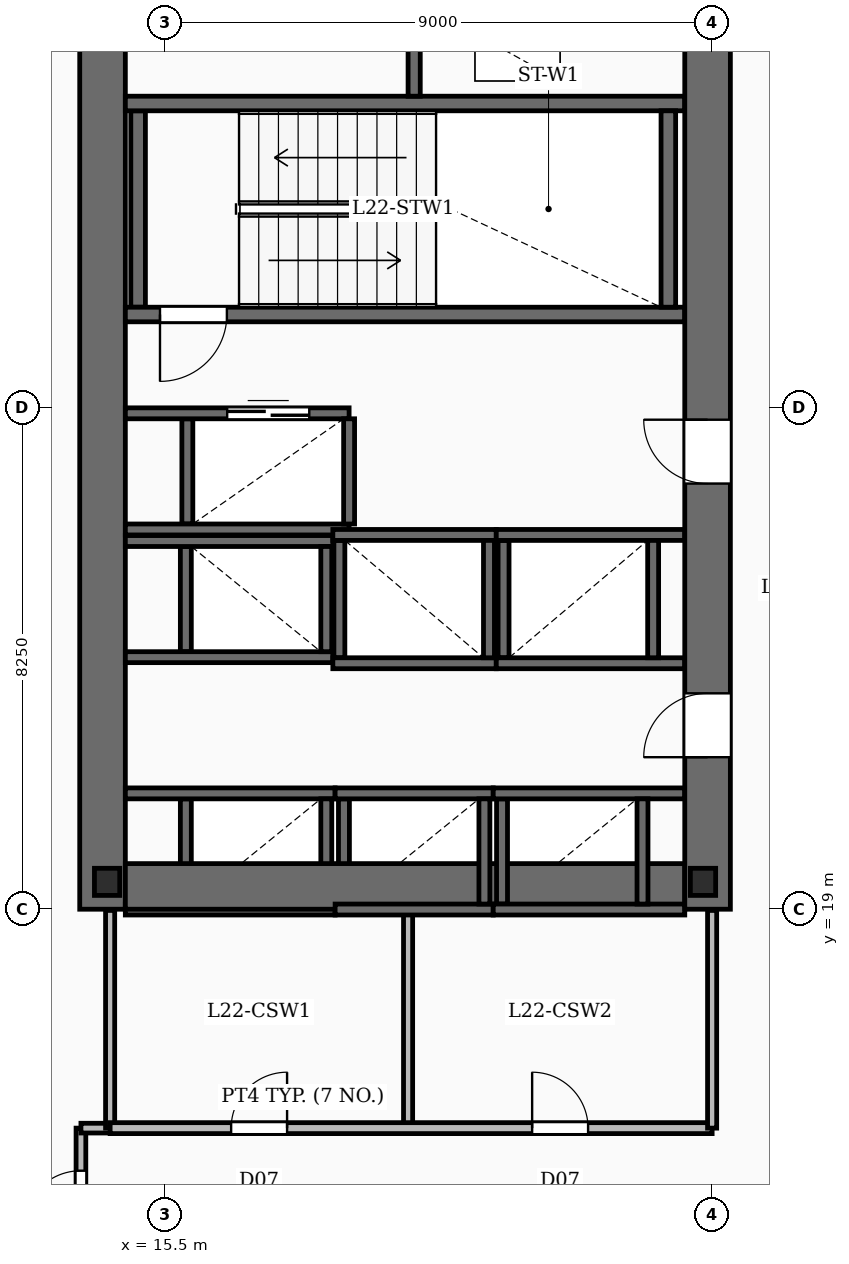
"""IFC4 building model, lengths in metres.
Left out: names, types, materials, properties, quantities, classifications, styles, units other than length and angle.
Written with IfcOpenShell. Run it as: python <this file> out.ifc"""

import sys

from ifc_helpers import new_model, si_unit, direction, frame, frame_2d, origin, origin_2d, place, context, subcontext, project, spatial, rectangle, i_section, extrude, element, fill, save


model = new_model("IFC4")
c1 = context("Model", 3, precision=1e-05, world=origin(), true_north=direction((0.0, 1.0)))
c2 = subcontext(c1, "Body", "Model", "MODEL_VIEW")
j1 = project(units=[si_unit("LENGTHUNIT", "METRE"), si_unit("PLANEANGLEUNIT", "RADIAN")], contexts=[c1])
p1 = place(None, origin())
s1 = spatial("IfcSite", under=j1, at=p1, CompositionType="ELEMENT")
p2 = place(p1, origin())
s2 = spatial("IfcBuilding", under=s1, at=p2, CompositionType="ELEMENT")
p3 = place(p2, frame((0.0, 0.0, 99.7)))
s3 = spatial("IfcBuildingStorey", under=s2, at=p3, CompositionType="ELEMENT", Elevation=99.7)
p4 = place(p3, frame((14.475, 19.0, -0.45), z_axis=(0.0, 0.0, 1.0), x_axis=(0.0, 1.0, 0.0)))
e1 = element("IfcWall", 1, at=p4, inside=s3, PredefinedType="SHEAR", context=c2, shape_type="SweptSolid", body=[
    extrude(rectangle(XDim=15.3, YDim=0.75, at=frame_2d((7.65, 0.0))), origin(), (0.0, 0.0, 1.0), 3.93),
])
p5 = place(p3, frame((24.425, 19.0, -0.45), z_axis=(0.0, 0.0, 1.0), x_axis=(0.0, 1.0, 0.0)))
e2 = element("IfcWall", 2, at=p5, inside=s3, PredefinedType="SHEAR", context=c2, shape_type="SweptSolid", body=[
    extrude(rectangle(XDim=15.3, YDim=0.75, at=frame_2d((7.65, 0.0))), origin(), (0.0, 0.0, 1.0), 3.93),
])
p6 = place(p5, frame((2.5, 0.0, 0.45)))
e3 = element("IfcOpeningElement", 3, at=p6, cuts=e2, PredefinedType="OPENING", context=c2, shape_type="SweptSolid", body=[
    extrude(rectangle(XDim=1.05, YDim=2.15, at=frame_2d((0.525, 1.075))), frame((0.0, 0.385, 0.0), z_axis=(0.0, -1.0, 0.0), x_axis=(1.0, 0.0, 0.0)), (0.0, 0.0, 1.0), 0.77),
])
p7 = place(p5, frame((7.0, 0.0, 0.45)))
e4 = element("IfcOpeningElement", 4, at=p7, cuts=e2, PredefinedType="OPENING", context=c2, shape_type="SweptSolid", body=[
    extrude(rectangle(XDim=1.05, YDim=2.15, at=frame_2d((0.525, 1.075))), frame((0.0, 0.385, 0.0), z_axis=(0.0, -1.0, 0.0), x_axis=(1.0, 0.0, 0.0)), (0.0, 0.0, 1.0), 0.77),
])
p8 = place(p3, frame((14.85, 19.375, -0.45), z_axis=(0.0, 0.0, 1.0), x_axis=(1.0, 0.0, 0.0)))
e5 = element("IfcWall", 5, at=p8, inside=s3, PredefinedType="SHEAR", context=c2, shape_type="SweptSolid", body=[
    extrude(rectangle(XDim=9.2, YDim=0.75, at=frame_2d((4.6, 0.0))), origin(), (0.0, 0.0, 1.0), 3.93),
])
for number, where, z_axis, x_axis in (
    (6, (14.55, 19.45, -0.45), (0.0, 0.0, 1.0), (1.0, 0.0, 0.0)),
    (7, (24.35, 19.45, -0.45), (0.0, 0.0, 1.0), (1.0, 0.0, 0.0)),
):
    element("IfcColumn", number, at=place(p3, frame(where, z_axis=z_axis, x_axis=x_axis)), inside=s3, PredefinedType="COLUMN", context=c2, shape_type="SweptSolid", body=[
        extrude(i_section(OverallWidth=0.416, OverallDepth=0.446, WebThickness=0.039, FlangeThickness=0.063, FilletRadius=0.02, at=origin_2d()), origin(), (0.0, 0.0, 1.0), 3.93),
    ])
p9 = place(p3, frame((24.05, 28.78, 0.0), z_axis=(0.0, 0.0, 1.0), x_axis=(-1.0, 0.0, 0.0)))
e8 = element("IfcWall", 8, at=p9, inside=s3, PredefinedType="SOLIDWALL", context=c2, shape_type="SweptSolid", body=[
    extrude(rectangle(XDim=9.2, YDim=0.24, at=frame_2d((4.6, 0.0))), origin(), (0.0, 0.0, 1.0), 3.48),
])
p10 = place(p9, frame((7.53, 0.0, 0.0)))
e9 = element("IfcOpeningElement", 9, at=p10, cuts=e8, PredefinedType="OPENING", context=c2, shape_type="SweptSolid", body=[
    extrude(rectangle(XDim=1.1, YDim=2.15, at=frame_2d((0.55, 1.075))), frame((0.0, 0.13, 0.0), z_axis=(0.0, -1.0, 0.0), x_axis=(1.0, 0.0, 0.0)), (0.0, 0.0, 1.0), 0.26),
])
p11 = place(p3, frame((14.85, 32.25, 0.0), z_axis=(0.0, 0.0, 1.0), x_axis=(1.0, 0.0, 0.0)))
e10 = element("IfcWall", 10, at=p11, inside=s3, PredefinedType="SOLIDWALL", context=c2, shape_type="SweptSolid", body=[
    extrude(rectangle(XDim=9.2, YDim=0.24, at=frame_2d((4.6, 0.0))), origin(), (0.0, 0.0, 1.0), 3.48),
])
for number, where, z_axis, x_axis in (
    (11, (15.06, 28.9, 0.0), (0.0, 0.0, 1.0), (0.0, 1.0, 0.0)),
    (12, (23.78, 28.9, 0.0), (0.0, 0.0, 1.0), (0.0, 1.0, 0.0)),
):
    element("IfcWall", number, at=place(p3, frame(where, z_axis=z_axis, x_axis=x_axis)), inside=s3, PredefinedType="SOLIDWALL", context=c2, shape_type="SweptSolid", body=[
        extrude(rectangle(XDim=3.23, YDim=0.24, at=frame_2d((1.615, 0.0))), origin(), (0.0, 0.0, 1.0), 3.48),
    ])
p12 = place(p3, frame((19.6, 32.37, 0.0), z_axis=(0.0, 0.0, 1.0), x_axis=(0.0, 1.0, 0.0)))
e13 = element("IfcWall", 13, at=p12, inside=s3, PredefinedType="SOLIDWALL", context=c2, shape_type="SweptSolid", body=[
    extrude(rectangle(XDim=1.13, YDim=0.2, at=frame_2d((0.565, 0.0))), origin(), (0.0, 0.0, 1.0), 3.48),
])
for number, where, z_axis, x_axis in (
    (14, (14.85, 20.905, 0.0), (0.0, 0.0, 1.0), (1.0, 0.0, 0.0)),
    (15, (14.85, 18.995, 0.0), (0.0, 0.0, 1.0), (1.0, 0.0, 0.0)),
):
    element("IfcWall", number, at=place(p3, frame(where, z_axis=z_axis, x_axis=x_axis)), inside=s3, PredefinedType="SOLIDWALL", context=c2, shape_type="SweptSolid", body=[
        extrude(rectangle(XDim=3.45, YDim=0.18, at=frame_2d((1.725, 0.0))), origin(), (0.0, 0.0, 1.0), 3.48),
    ])
for number, where, z_axis, x_axis in (
    (16, (15.845, 19.085, 0.0), (0.0, 0.0, 1.0), (0.0, 1.0, 0.0)),
    (17, (18.155, 19.085, 0.0), (0.0, 0.0, 1.0), (0.0, 1.0, 0.0)),
):
    element("IfcWall", number, at=place(p3, frame(where, z_axis=z_axis, x_axis=x_axis)), inside=s3, PredefinedType="SOLIDWALL", context=c2, shape_type="SweptSolid", body=[
        extrude(rectangle(XDim=1.73, YDim=0.18, at=frame_2d((0.865, 0.0))), origin(), (0.0, 0.0, 1.0), 3.48),
    ])
for number, where, z_axis, x_axis in (
    (18, (18.3, 20.905, 0.0), (0.0, 0.0, 1.0), (1.0, 0.0, 0.0)),
    (19, (18.3, 18.995, 0.0), (0.0, 0.0, 1.0), (1.0, 0.0, 0.0)),
):
    element("IfcWall", number, at=place(p3, frame(where, z_axis=z_axis, x_axis=x_axis)), inside=s3, PredefinedType="SOLIDWALL", context=c2, shape_type="SweptSolid", body=[
        extrude(rectangle(XDim=2.6, YDim=0.18, at=frame_2d((1.3, 0.0))), origin(), (0.0, 0.0, 1.0), 3.48),
    ])
for number, where, z_axis, x_axis in (
    (20, (18.445, 19.085, 0.0), (0.0, 0.0, 1.0), (0.0, 1.0, 0.0)),
    (21, (20.755, 19.085, 0.0), (0.0, 0.0, 1.0), (0.0, 1.0, 0.0)),
):
    element("IfcWall", number, at=place(p3, frame(where, z_axis=z_axis, x_axis=x_axis)), inside=s3, PredefinedType="SOLIDWALL", context=c2, shape_type="SweptSolid", body=[
        extrude(rectangle(XDim=1.73, YDim=0.18, at=frame_2d((0.865, 0.0))), origin(), (0.0, 0.0, 1.0), 3.48),
    ])
for number, where, z_axis, x_axis in (
    (22, (20.9, 20.905, 0.0), (0.0, 0.0, 1.0), (1.0, 0.0, 0.0)),
    (23, (20.9, 18.995, 0.0), (0.0, 0.0, 1.0), (1.0, 0.0, 0.0)),
):
    element("IfcWall", number, at=place(p3, frame(where, z_axis=z_axis, x_axis=x_axis)), inside=s3, PredefinedType="SOLIDWALL", context=c2, shape_type="SweptSolid", body=[
        extrude(rectangle(XDim=3.15, YDim=0.18, at=frame_2d((1.575, 0.0))), origin(), (0.0, 0.0, 1.0), 3.48),
    ])
for number, where, z_axis, x_axis in (
    (24, (21.045, 19.085, 0.0), (0.0, 0.0, 1.0), (0.0, 1.0, 0.0)),
    (25, (23.355, 19.085, 0.0), (0.0, 0.0, 1.0), (0.0, 1.0, 0.0)),
):
    element("IfcWall", number, at=place(p3, frame(where, z_axis=z_axis, x_axis=x_axis)), inside=s3, PredefinedType="SOLIDWALL", context=c2, shape_type="SweptSolid", body=[
        extrude(rectangle(XDim=1.73, YDim=0.18, at=frame_2d((0.865, 0.0))), origin(), (0.0, 0.0, 1.0), 3.48),
    ])
for number, where, z_axis, x_axis in (
    (26, (14.85, 25.055, 0.0), (0.0, 0.0, 1.0), (1.0, 0.0, 0.0)),
    (27, (14.85, 23.145, 0.0), (0.0, 0.0, 1.0), (1.0, 0.0, 0.0)),
):
    element("IfcWall", number, at=place(p3, frame(where, z_axis=z_axis, x_axis=x_axis)), inside=s3, PredefinedType="SOLIDWALL", context=c2, shape_type="SweptSolid", body=[
        extrude(rectangle(XDim=3.412, YDim=0.18, at=frame_2d((1.706, 0.0))), origin(), (0.0, 0.0, 1.0), 3.48),
    ])
for number, where, z_axis, x_axis in (
    (28, (15.845, 23.235, 0.0), (0.0, 0.0, 1.0), (0.0, 1.0, 0.0)),
    (29, (18.155, 23.235, 0.0), (0.0, 0.0, 1.0), (0.0, 1.0, 0.0)),
):
    element("IfcWall", number, at=place(p3, frame(where, z_axis=z_axis, x_axis=x_axis)), inside=s3, PredefinedType="SOLIDWALL", context=c2, shape_type="SweptSolid", body=[
        extrude(rectangle(XDim=1.73, YDim=0.18, at=frame_2d((0.865, 0.0))), origin(), (0.0, 0.0, 1.0), 3.48),
    ])
for number, where, z_axis, x_axis in (
    (30, (18.262, 25.155, 0.0), (0.0, 0.0, 1.0), (1.0, 0.0, 0.0)),
    (31, (18.262, 23.045, 0.0), (0.0, 0.0, 1.0), (1.0, 0.0, 0.0)),
):
    element("IfcWall", number, at=place(p3, frame(where, z_axis=z_axis, x_axis=x_axis)), inside=s3, PredefinedType="SOLIDWALL", context=c2, shape_type="SweptSolid", body=[
        extrude(rectangle(XDim=2.688, YDim=0.18, at=frame_2d((1.344, 0.0))), origin(), (0.0, 0.0, 1.0), 3.48),
    ])
for number, where, z_axis, x_axis in (
    (32, (18.37, 23.135, 0.0), (0.0, 0.0, 1.0), (0.0, 1.0, 0.0)),
    (33, (20.83, 23.135, 0.0), (0.0, 0.0, 1.0), (0.0, 1.0, 0.0)),
):
    element("IfcWall", number, at=place(p3, frame(where, z_axis=z_axis, x_axis=x_axis)), inside=s3, PredefinedType="SOLIDWALL", context=c2, shape_type="SweptSolid", body=[
        extrude(rectangle(XDim=1.93, YDim=0.18, at=frame_2d((0.965, 0.0))), origin(), (0.0, 0.0, 1.0), 3.48),
    ])
for number, where, z_axis, x_axis in (
    (34, (20.95, 25.155, 0.0), (0.0, 0.0, 1.0), (1.0, 0.0, 0.0)),
    (35, (20.95, 23.045, 0.0), (0.0, 0.0, 1.0), (1.0, 0.0, 0.0)),
):
    element("IfcWall", number, at=place(p3, frame(where, z_axis=z_axis, x_axis=x_axis)), inside=s3, PredefinedType="SOLIDWALL", context=c2, shape_type="SweptSolid", body=[
        extrude(rectangle(XDim=3.1, YDim=0.18, at=frame_2d((1.55, 0.0))), origin(), (0.0, 0.0, 1.0), 3.48),
    ])
for number, where, z_axis, x_axis in (
    (36, (21.07, 23.135, 0.0), (0.0, 0.0, 1.0), (0.0, 1.0, 0.0)),
    (37, (23.53, 23.135, 0.0), (0.0, 0.0, 1.0), (0.0, 1.0, 0.0)),
):
    element("IfcWall", number, at=place(p3, frame(where, z_axis=z_axis, x_axis=x_axis)), inside=s3, PredefinedType="SOLIDWALL", context=c2, shape_type="SweptSolid", body=[
        extrude(rectangle(XDim=1.93, YDim=0.18, at=frame_2d((0.965, 0.0))), origin(), (0.0, 0.0, 1.0), 3.48),
    ])
p13 = place(p3, frame((14.85, 27.155, 0.0), z_axis=(0.0, 0.0, 1.0), x_axis=(1.0, 0.0, 0.0)))
e38 = element("IfcWall", 38, at=p13, inside=s3, PredefinedType="SOLIDWALL", context=c2, shape_type="SweptSolid", body=[
    extrude(rectangle(XDim=3.68, YDim=0.18, at=frame_2d((1.84, 0.0))), origin(), (0.0, 0.0, 1.0), 3.48),
])
p14 = place(p13, frame((1.675, 0.0, 0.0)))
e39 = element("IfcOpeningElement", 39, at=p14, cuts=e38, PredefinedType="OPENING", context=c2, shape_type="SweptSolid", body=[
    extrude(rectangle(XDim=1.35, YDim=2.3, at=frame_2d((0.675, 1.15))), frame((0.0, 0.1, 0.0), z_axis=(0.0, -1.0, 0.0), x_axis=(1.0, 0.0, 0.0)), (0.0, 0.0, 1.0), 0.2),
])
p15 = place(p3, frame((14.85, 25.245, 0.0), z_axis=(0.0, 0.0, 1.0), x_axis=(1.0, 0.0, 0.0)))
e40 = element("IfcWall", 40, at=p15, inside=s3, PredefinedType="SOLIDWALL", context=c2, shape_type="SweptSolid", body=[
    extrude(rectangle(XDim=3.68, YDim=0.18, at=frame_2d((1.84, 0.0))), origin(), (0.0, 0.0, 1.0), 3.48),
])
for number, where, z_axis, x_axis in (
    (41, (15.87, 25.335, 0.0), (0.0, 0.0, 1.0), (0.0, 1.0, 0.0)),
    (42, (18.53, 25.335, 0.0), (0.0, 0.0, 1.0), (0.0, 1.0, 0.0)),
):
    element("IfcWall", number, at=place(p3, frame(where, z_axis=z_axis, x_axis=x_axis)), inside=s3, PredefinedType="SOLIDWALL", context=c2, shape_type="SweptSolid", body=[
        extrude(rectangle(XDim=1.73, YDim=0.18, at=frame_2d((0.865, 0.0))), origin(), (0.0, 0.0, 1.0), 3.48),
    ])
p16 = place(p3, frame((19.5, 15.4, 0.0), z_axis=(0.0, 0.0, 1.0), x_axis=(0.0, 1.0, 0.0)))
e43 = element("IfcWall", 43, at=p16, inside=s3, PredefinedType="PARTITIONING", context=c2, shape_type="SweptSolid", body=[
    extrude(rectangle(XDim=3.58, YDim=0.15, at=frame_2d((1.79, 0.0))), origin(), (0.0, 0.0, 1.0), 2.54),
])
p17 = place(p3, frame((14.6, 15.4, 0.0), z_axis=(0.0, 0.0, 1.0), x_axis=(1.0, 0.0, 0.0)))
e44 = element("IfcWall", 44, at=p17, inside=s3, PredefinedType="PARTITIONING", context=c2, shape_type="SweptSolid", body=[
    extrude(rectangle(XDim=9.9, YDim=0.18, at=frame_2d((4.95, 0.0))), origin(), (0.0, 0.0, 1.0), 2.54),
])
p18 = place(p17, frame((1.99, 0.0, 0.0)))
e45 = element("IfcOpeningElement", 45, at=p18, cuts=e44, PredefinedType="OPENING", context=c2, shape_type="SweptSolid", body=[
    extrude(rectangle(XDim=0.92, YDim=2.1, at=frame_2d((0.46, 1.05))), frame((0.0, 0.1, 0.0), z_axis=(0.0, -1.0, 0.0), x_axis=(1.0, 0.0, 0.0)), (0.0, 0.0, 1.0), 0.2),
])
p19 = place(p17, frame((6.94, 0.0, 0.0)))
e46 = element("IfcOpeningElement", 46, at=p19, cuts=e44, PredefinedType="OPENING", context=c2, shape_type="SweptSolid", body=[
    extrude(rectangle(XDim=0.92, YDim=2.1, at=frame_2d((0.46, 1.05))), frame((0.0, 0.1, 0.0), z_axis=(0.0, -1.0, 0.0), x_axis=(1.0, 0.0, 0.0)), (0.0, 0.0, 1.0), 0.2),
])
for number, where, z_axis, x_axis in (
    (47, (14.6, 15.4, 0.0), (0.0, 0.0, 1.0), (0.0, 1.0, 0.0)),
    (48, (24.5, 15.4, 0.0), (0.0, 0.0, 1.0), (0.0, 1.0, 0.0)),
):
    element("IfcWall", number, at=place(p3, frame(where, z_axis=z_axis, x_axis=x_axis)), inside=s3, PredefinedType="PARTITIONING", context=c2, shape_type="SweptSolid", body=[
        extrude(rectangle(XDim=3.58, YDim=0.15, at=frame_2d((1.79, 0.0))), origin(), (0.0, 0.0, 1.0), 2.54),
    ])
p20 = place(p3, frame((14.12, 13.1, 0.0), z_axis=(0.0, 0.0, 1.0), x_axis=(0.0, 1.0, 0.0)))
e49 = element("IfcWall", 49, at=p20, inside=s3, PredefinedType="PARTITIONING", context=c2, shape_type="SweptSolid", body=[
    extrude(rectangle(XDim=2.3, YDim=0.16, at=frame_2d((1.15, 0.0))), origin(), (0.0, 0.0, 1.0), 2.54),
])
p21 = place(p20, frame((0.65, 0.0, 0.0)))
e50 = element("IfcOpeningElement", 50, at=p21, cuts=e49, PredefinedType="OPENING", context=c2, shape_type="SweptSolid", body=[
    extrude(rectangle(XDim=0.95, YDim=2.15, at=frame_2d((0.475, 1.075))), frame((0.0, 0.09, 0.0), z_axis=(0.0, -1.0, 0.0), x_axis=(1.0, 0.0, 0.0)), (0.0, 0.0, 1.0), 0.18),
])
p22 = place(p3, frame((14.12, 15.4, 0.0), z_axis=(0.0, 0.0, 1.0), x_axis=(1.0, 0.0, 0.0)))
e51 = element("IfcWall", 51, at=p22, inside=s3, PredefinedType="PARTITIONING", context=c2, shape_type="SweptSolid", body=[
    extrude(rectangle(XDim=0.5, YDim=0.16, at=frame_2d((0.25, 0.0))), origin(), (0.0, 0.0, 1.0), 2.54),
])
p23 = place(p6, origin())
e52 = element("IfcDoor", 52, at=p23, inside=s3, OperationType="SINGLE_SWING_LEFT", PredefinedType="DOOR", context=c2, shape_type="SweptSolid", body=[
    extrude(rectangle(XDim=1.05, YDim=2.15, at=frame_2d((0.525, 1.075))), frame((0.0, 0.025, 0.0), z_axis=(0.0, -1.0, 0.0), x_axis=(1.0, 0.0, 0.0)), (0.0, 0.0, 1.0), 0.05),
])
fill(e3, e52)
p24 = place(p7, origin())
e53 = element("IfcDoor", 53, at=p24, inside=s3, OperationType="SINGLE_SWING_RIGHT", PredefinedType="DOOR", context=c2, shape_type="SweptSolid", body=[
    extrude(rectangle(XDim=1.05, YDim=2.15, at=frame_2d((0.525, 1.075))), frame((0.0, 0.025, 0.0), z_axis=(0.0, -1.0, 0.0), x_axis=(1.0, 0.0, 0.0)), (0.0, 0.0, 1.0), 0.05),
])
fill(e4, e53)
p25 = place(p10, origin())
e54 = element("IfcDoor", 54, at=p25, inside=s3, OperationType="SINGLE_SWING_RIGHT", PredefinedType="DOOR", context=c2, shape_type="SweptSolid", body=[
    extrude(rectangle(XDim=1.1, YDim=2.15, at=frame_2d((0.55, 1.075))), frame((0.0, 0.025, 0.0), z_axis=(0.0, -1.0, 0.0), x_axis=(1.0, 0.0, 0.0)), (0.0, 0.0, 1.0), 0.05),
])
fill(e9, e54)
p26 = place(p14, origin())
e55 = element("IfcDoor", 55, at=p26, inside=s3, OperationType="DOUBLE_DOOR_SLIDING", PredefinedType="DOOR", context=c2, shape_type="SweptSolid", body=[
    extrude(rectangle(XDim=1.35, YDim=2.3, at=frame_2d((0.675, 1.15))), frame((0.0, 0.025, 0.0), z_axis=(0.0, -1.0, 0.0), x_axis=(1.0, 0.0, 0.0)), (0.0, 0.0, 1.0), 0.05),
])
fill(e39, e55)
p27 = place(p18, origin())
e56 = element("IfcDoor", 56, at=p27, inside=s3, OperationType="SINGLE_SWING_RIGHT", PredefinedType="DOOR", context=c2, shape_type="SweptSolid", body=[
    extrude(rectangle(XDim=0.92, YDim=2.1, at=frame_2d((0.46, 1.05))), frame((0.0, 0.025, 0.0), z_axis=(0.0, -1.0, 0.0), x_axis=(1.0, 0.0, 0.0)), (0.0, 0.0, 1.0), 0.05),
])
fill(e45, e56)
p28 = place(p19, origin())
e57 = element("IfcDoor", 57, at=p28, inside=s3, OperationType="SINGLE_SWING_LEFT", PredefinedType="DOOR", context=c2, shape_type="SweptSolid", body=[
    extrude(rectangle(XDim=0.92, YDim=2.1, at=frame_2d((0.46, 1.05))), frame((0.0, 0.025, 0.0), z_axis=(0.0, -1.0, 0.0), x_axis=(1.0, 0.0, 0.0)), (0.0, 0.0, 1.0), 0.05),
])
fill(e46, e57)
p29 = place(p21, origin())
e58 = element("IfcDoor", 58, at=p29, inside=s3, OperationType="SINGLE_SWING_LEFT", PredefinedType="DOOR", context=c2, shape_type="SweptSolid", body=[
    extrude(rectangle(XDim=0.95, YDim=2.15, at=frame_2d((0.475, 1.075))), frame((0.0, 0.025, 0.0), z_axis=(0.0, -1.0, 0.0), x_axis=(1.0, 0.0, 0.0)), (0.0, 0.0, 1.0), 0.05),
])
fill(e50, e58)
save(model, sys.argv[1])
